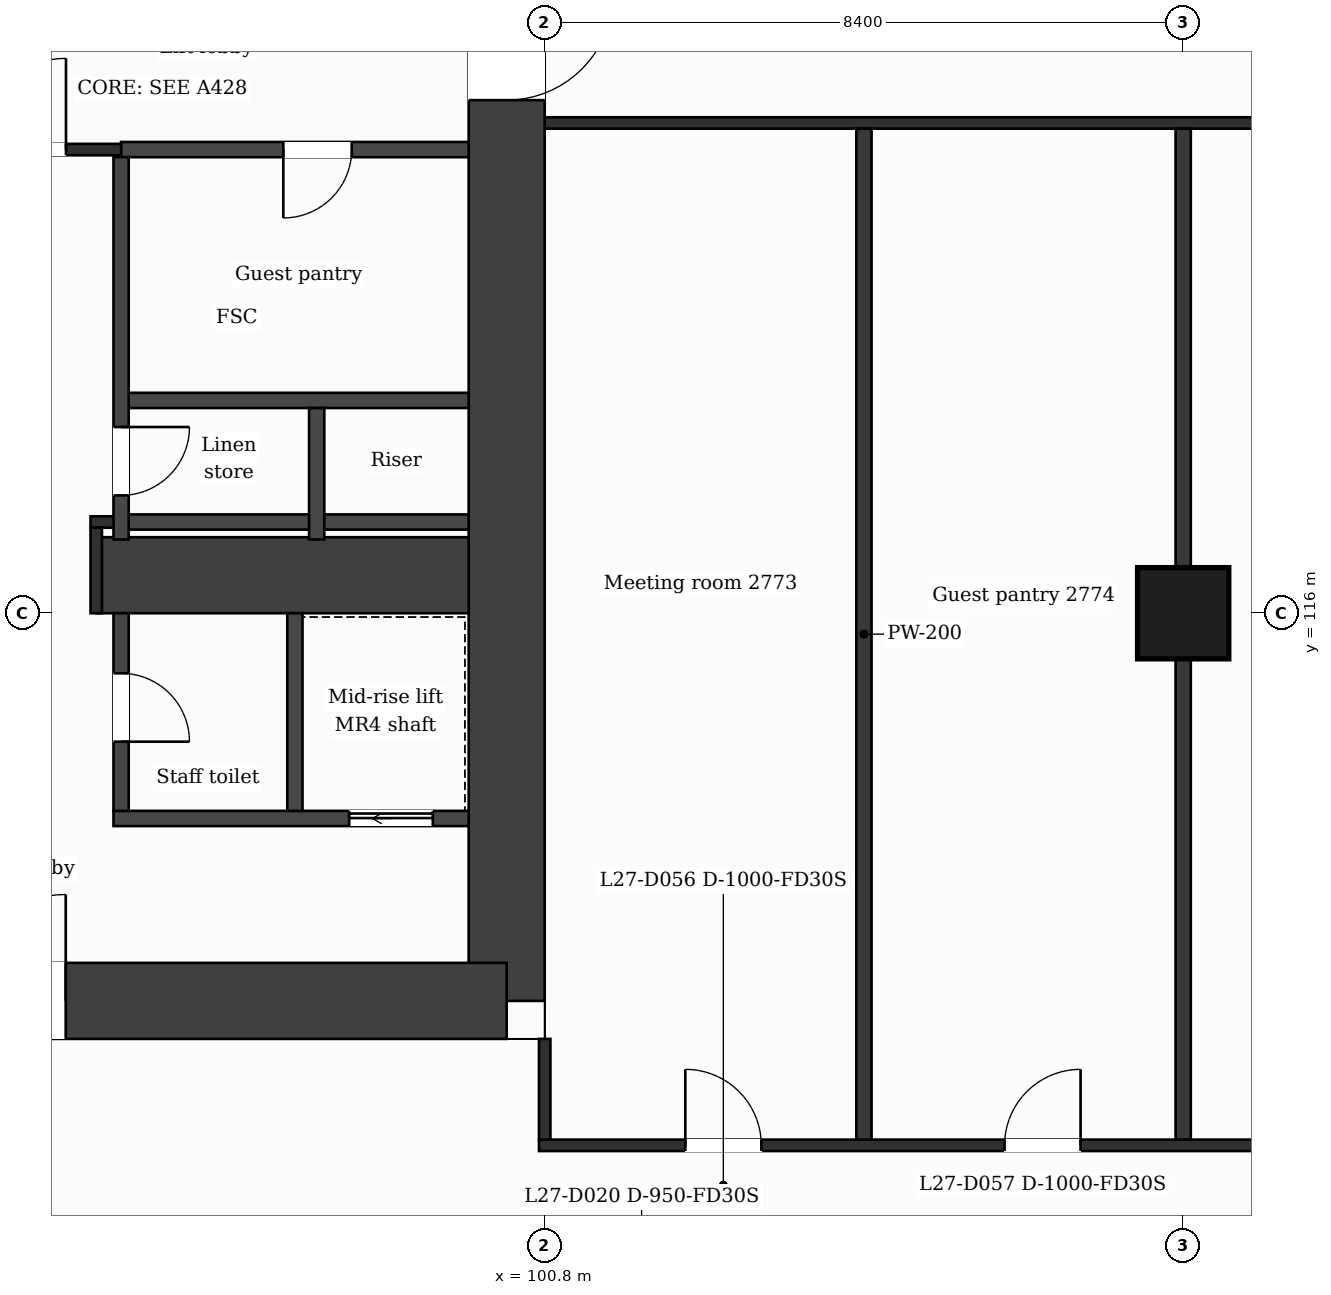
"""IFC4 building model, lengths in metres.
Left out: names, types, materials, properties, quantities, classifications, styles, units other than length and angle.
Written with IfcOpenShell. Run it as: python <this file> out.ifc"""

import sys

from ifc_helpers import new_model, si_unit, direction, frame, frame_2d, origin, origin_2d, place, context, subcontext, project, spatial, rectangle, extrude, element, fill, save


model = new_model("IFC4")
c1 = context("Model", 3, precision=1e-05, world=origin(), true_north=direction((0.0, 1.0)))
c2 = subcontext(c1, "Body", "Model", "MODEL_VIEW")
j1 = project(units=[si_unit("LENGTHUNIT", "METRE"), si_unit("PLANEANGLEUNIT", "RADIAN")], contexts=[c1])
p1 = place(None, origin())
s1 = spatial("IfcSite", under=j1, at=p1, CompositionType="ELEMENT")
p2 = place(p1, origin())
s2 = spatial("IfcBuilding", under=s1, at=p2, CompositionType="ELEMENT")
p3 = place(p2, frame((0.0, 0.0, 116.9)))
s3 = spatial("IfcBuildingStorey", under=s2, at=p3, CompositionType="ELEMENT", Elevation=116.9)
p4 = place(p3, frame((100.3, 131.9, 0.0), z_axis=(0.0, 0.0, 1.0), x_axis=(0.0, -1.0, 0.0)))
e1 = element("IfcWall", 1, at=p4, inside=s3, PredefinedType="SHEAR", context=c2, shape_type="SweptSolid", body=[
    extrude(rectangle(XDim=21.0, YDim=1.0, at=frame_2d((10.5, 0.0))), origin(), (0.0, 0.0, 1.0), 3.7),
])
p5 = place(p4, frame((7.75, 0.0, 0.0)))
e2 = element("IfcOpeningElement", 2, at=p5, cuts=e1, PredefinedType="OPENING", context=c2, shape_type="SweptSolid", body=[
    extrude(rectangle(XDim=1.4, YDim=2.1, at=frame_2d((0.7, 1.05))), frame((0.0, 0.51, 0.0), z_axis=(0.0, -1.0, 0.0), x_axis=(1.0, 0.0, 0.0)), (0.0, 0.0, 1.0), 1.02),
])
p6 = place(p3, frame((100.3, 110.9, 0.0), z_axis=(0.0, 0.0, 1.0), x_axis=(-1.0, 0.0, 0.0)))
e3 = element("IfcWall", 3, at=p6, inside=s3, PredefinedType="SHEAR", context=c2, shape_type="SweptSolid", body=[
    extrude(rectangle(XDim=14.059, YDim=1.0, at=frame_2d((7.03, 0.0))), origin(), (0.0, 0.0, 1.0), 3.7),
])
p7 = place(p6, frame((5.802, 0.0, 0.0)))
e4 = element("IfcOpeningElement", 4, at=p7, cuts=e3, PredefinedType="OPENING", context=c2, shape_type="SweptSolid", body=[
    extrude(rectangle(XDim=1.4, YDim=2.1, at=frame_2d((0.7, 1.05))), frame((0.0, 0.51, 0.0), z_axis=(0.0, -1.0, 0.0), x_axis=(1.0, 0.0, 0.0)), (0.0, 0.0, 1.0), 1.02),
])
p8 = place(p3, frame((94.9, 116.5, 0.0), z_axis=(0.0, 0.0, 1.0), x_axis=(1.0, 0.0, 0.0)))
e5 = element("IfcWall", 5, at=p8, inside=s3, PredefinedType="SHEAR", context=c2, shape_type="SweptSolid", body=[
    extrude(rectangle(XDim=4.9, YDim=1.0, at=frame_2d((2.45, 0.0))), origin(), (0.0, 0.0, 1.0), 3.7),
])
p9 = place(p3, frame((109.2, 116.0, 0.0), z_axis=(0.0, 0.0, 1.0), x_axis=(1.0, 0.0, 0.0)))
e6 = element("IfcColumn", 6, at=p9, inside=s3, PredefinedType="COLUMN", context=c2, shape_type="SweptSolid", body=[
    extrude(rectangle(XDim=1.2, YDim=1.2, at=origin_2d()), origin(), (0.0, 0.0, 1.0), 3.7),
])
p10 = place(p3, frame((100.725, 109.0, 0.0), z_axis=(0.0, 0.0, 1.0), x_axis=(1.0, 0.0, 0.0)))
e7 = element("IfcWall", 7, at=p10, inside=s3, PredefinedType="PARTITIONING", context=c2, shape_type="SweptSolid", body=[
    extrude(rectangle(XDim=25.35, YDim=0.15, at=frame_2d((12.675, 0.0))), origin(), (0.0, 0.0, 1.0), 3.38),
])
p11 = place(p10, frame((1.925, 0.0, 0.0)))
e8 = element("IfcOpeningElement", 8, at=p11, cuts=e7, PredefinedType="OPENING", context=c2, shape_type="SweptSolid", body=[
    extrude(rectangle(XDim=1.0, YDim=2.1, at=frame_2d((0.5, 1.05))), frame((0.0, 0.085, 0.0), z_axis=(0.0, -1.0, 0.0), x_axis=(1.0, 0.0, 0.0)), (0.0, 0.0, 1.0), 0.17),
])
p12 = place(p10, frame((6.125, 0.0, 0.0)))
e9 = element("IfcOpeningElement", 9, at=p12, cuts=e7, PredefinedType="OPENING", context=c2, shape_type="SweptSolid", body=[
    extrude(rectangle(XDim=1.0, YDim=2.1, at=frame_2d((0.5, 1.05))), frame((0.0, 0.085, 0.0), z_axis=(0.0, -1.0, 0.0), x_axis=(1.0, 0.0, 0.0)), (0.0, 0.0, 1.0), 0.17),
])
p13 = place(p10, frame((12.175, 0.0, 0.0)))
e10 = element("IfcOpeningElement", 10, at=p13, cuts=e7, PredefinedType="OPENING", context=c2, shape_type="SweptSolid", body=[
    extrude(rectangle(XDim=1.0, YDim=2.1, at=frame_2d((0.5, 1.05))), frame((0.0, 0.085, 0.0), z_axis=(0.0, -1.0, 0.0), x_axis=(1.0, 0.0, 0.0)), (0.0, 0.0, 1.0), 0.17),
])
p14 = place(p10, frame((19.1, 0.0, 0.0)))
e11 = element("IfcOpeningElement", 11, at=p14, cuts=e7, PredefinedType="OPENING", context=c2, shape_type="SweptSolid", body=[
    extrude(rectangle(XDim=1.0, YDim=2.1, at=frame_2d((0.5, 1.05))), frame((0.0, 0.085, 0.0), z_axis=(0.0, -1.0, 0.0), x_axis=(1.0, 0.0, 0.0)), (0.0, 0.0, 1.0), 0.17),
])
p15 = place(p10, frame((22.05, 0.0, 0.0)))
e12 = element("IfcOpeningElement", 12, at=p15, cuts=e7, PredefinedType="OPENING", context=c2, shape_type="SweptSolid", body=[
    extrude(rectangle(XDim=1.0, YDim=2.1, at=frame_2d((0.5, 1.05))), frame((0.0, 0.085, 0.0), z_axis=(0.0, -1.0, 0.0), x_axis=(1.0, 0.0, 0.0)), (0.0, 0.0, 1.0), 0.17),
])
p16 = place(p3, frame((95.127, 113.3, 0.0), z_axis=(0.0, 0.0, 1.0), x_axis=(1.0, 0.0, 0.0)))
e13 = element("IfcWall", 13, at=p16, inside=s3, PredefinedType="PARTITIONING", context=c2, shape_type="SweptSolid", body=[
    extrude(rectangle(XDim=4.673, YDim=0.2, at=frame_2d((2.336, 0.0))), origin(), (0.0, 0.0, 1.0), 3.38),
])
p17 = place(p16, frame((3.101, 0.0, 0.0)))
e14 = element("IfcOpeningElement", 14, at=p17, cuts=e13, PredefinedType="OPENING", context=c2, shape_type="SweptSolid", body=[
    extrude(rectangle(XDim=1.1, YDim=2.1, at=frame_2d((0.55, 1.05))), frame((0.0, 0.11, 0.0), z_axis=(0.0, -1.0, 0.0), x_axis=(1.0, 0.0, 0.0)), (0.0, 0.0, 1.0), 0.22),
])
p18 = place(p3, frame((95.227, 117.2, 0.0), z_axis=(0.0, 0.0, 1.0), x_axis=(1.0, 0.0, 0.0)))
e15 = element("IfcWall", 15, at=p18, inside=s3, PredefinedType="PARTITIONING", context=c2, shape_type="SweptSolid", body=[
    extrude(rectangle(XDim=4.573, YDim=0.2, at=frame_2d((2.287, 0.0))), origin(), (0.0, 0.0, 1.0), 3.38),
])
p19 = place(p3, frame((94.825, 117.2, 0.0), z_axis=(0.0, 0.0, 1.0), x_axis=(1.0, 0.0, 0.0)))
e16 = element("IfcWall", 16, at=p19, inside=s3, PredefinedType="PARTITIONING", context=c2, shape_type="SweptSolid", body=[
    extrude(rectangle(XDim=0.402, YDim=0.15, at=frame_2d((0.201, 0.0))), origin(), (0.0, 0.0, 1.0), 3.38),
])
p20 = place(p3, frame((95.227, 118.8, 0.0), z_axis=(0.0, 0.0, 1.0), x_axis=(1.0, 0.0, 0.0)))
e17 = element("IfcWall", 17, at=p20, inside=s3, PredefinedType="PARTITIONING", context=c2, shape_type="SweptSolid", body=[
    extrude(rectangle(XDim=4.573, YDim=0.2, at=frame_2d((2.287, 0.0))), origin(), (0.0, 0.0, 1.0), 3.38),
])
p21 = place(p3, frame((95.227, 122.1, 0.0), z_axis=(0.0, 0.0, 1.0), x_axis=(1.0, 0.0, 0.0)))
e18 = element("IfcWall", 18, at=p21, inside=s3, PredefinedType="PARTITIONING", context=c2, shape_type="SweptSolid", body=[
    extrude(rectangle(XDim=4.573, YDim=0.2, at=frame_2d((2.287, 0.0))), origin(), (0.0, 0.0, 1.0), 3.38),
])
p22 = place(p21, frame((2.134, 0.0, 0.0)))
e19 = element("IfcOpeningElement", 19, at=p22, cuts=e18, PredefinedType="OPENING", context=c2, shape_type="SweptSolid", body=[
    extrude(rectangle(XDim=0.9, YDim=2.1, at=frame_2d((0.45, 1.05))), frame((0.0, 0.11, 0.0), z_axis=(0.0, -1.0, 0.0), x_axis=(1.0, 0.0, 0.0)), (0.0, 0.0, 1.0), 0.22),
])
p23 = place(p3, frame((92.827, 122.1, 0.0), z_axis=(0.0, 0.0, 1.0), x_axis=(1.0, 0.0, 0.0)))
e20 = element("IfcWall", 20, at=p23, inside=s3, PredefinedType="PARTITIONING", context=c2, shape_type="SweptSolid", body=[
    extrude(rectangle(XDim=2.4, YDim=0.15, at=frame_2d((1.2, 0.0))), origin(), (0.0, 0.0, 1.0), 3.38),
])
p24 = place(p23, frame((0.475, 0.0, 0.0)))
e21 = element("IfcOpeningElement", 21, at=p24, cuts=e20, PredefinedType="OPENING", context=c2, shape_type="SweptSolid", body=[
    extrude(rectangle(XDim=1.2, YDim=2.1, at=frame_2d((0.6, 1.05))), frame((0.0, 0.085, 0.0), z_axis=(0.0, -1.0, 0.0), x_axis=(1.0, 0.0, 0.0)), (0.0, 0.0, 1.0), 0.17),
])
p25 = place(p3, frame((100.8, 122.45, 0.0), z_axis=(0.0, 0.0, 1.0), x_axis=(1.0, 0.0, 0.0)))
e22 = element("IfcWall", 22, at=p25, inside=s3, PredefinedType="PARTITIONING", context=c2, shape_type="SweptSolid", body=[
    extrude(rectangle(XDim=25.2, YDim=0.15, at=frame_2d((12.6, 0.0))), origin(), (0.0, 0.0, 1.0), 3.38),
])
p26 = place(p3, frame((94.9, 116.0, 0.0), z_axis=(0.0, 0.0, 1.0), x_axis=(0.0, 1.0, 0.0)))
e23 = element("IfcWall", 23, at=p26, inside=s3, PredefinedType="PARTITIONING", context=c2, shape_type="SweptSolid", body=[
    extrude(rectangle(XDim=1.125, YDim=0.15, at=frame_2d((0.562, 0.0))), origin(), (0.0, 0.0, 1.0), 3.38),
])
p27 = place(p3, frame((95.227, 113.4, 0.0), z_axis=(0.0, 0.0, 1.0), x_axis=(0.0, 1.0, 0.0)))
e24 = element("IfcWall", 24, at=p27, inside=s3, PredefinedType="PARTITIONING", context=c2, shape_type="SweptSolid", body=[
    extrude(rectangle(XDim=2.6, YDim=0.2, at=frame_2d((1.3, 0.0))), origin(), (0.0, 0.0, 1.0), 3.38),
])
p28 = place(p27, frame((0.91, 0.0, 0.0)))
e25 = element("IfcOpeningElement", 25, at=p28, cuts=e24, PredefinedType="OPENING", context=c2, shape_type="SweptSolid", body=[
    extrude(rectangle(XDim=0.9, YDim=2.1, at=frame_2d((0.45, 1.05))), frame((0.0, 0.11, 0.0), z_axis=(0.0, -1.0, 0.0), x_axis=(1.0, 0.0, 0.0)), (0.0, 0.0, 1.0), 0.22),
])
p29 = place(p3, frame((95.227, 116.97, 0.0), z_axis=(0.0, 0.0, 1.0), x_axis=(0.0, 1.0, 0.0)))
e26 = element("IfcWall", 26, at=p29, inside=s3, PredefinedType="PARTITIONING", context=c2, shape_type="SweptSolid", body=[
    extrude(rectangle(XDim=5.03, YDim=0.2, at=frame_2d((2.515, 0.0))), origin(), (0.0, 0.0, 1.0), 3.38),
])
p30 = place(p29, frame((0.58, 0.0, 0.0)))
e27 = element("IfcOpeningElement", 27, at=p30, cuts=e26, PredefinedType="OPENING", context=c2, shape_type="SweptSolid", body=[
    extrude(rectangle(XDim=0.9, YDim=2.1, at=frame_2d((0.45, 1.05))), frame((0.0, 0.11, 0.0), z_axis=(0.0, -1.0, 0.0), x_axis=(1.0, 0.0, 0.0)), (0.0, 0.0, 1.0), 0.22),
])
p31 = place(p3, frame((97.513, 113.4, 0.0), z_axis=(0.0, 0.0, 1.0), x_axis=(0.0, 1.0, 0.0)))
e28 = element("IfcWall", 28, at=p31, inside=s3, PredefinedType="PARTITIONING", context=c2, shape_type="SweptSolid", body=[
    extrude(rectangle(XDim=2.6, YDim=0.2, at=frame_2d((1.3, 0.0))), origin(), (0.0, 0.0, 1.0), 3.38),
])
p32 = place(p3, frame((97.8, 116.97, 0.0), z_axis=(0.0, 0.0, 1.0), x_axis=(0.0, 1.0, 0.0)))
e29 = element("IfcWall", 29, at=p32, inside=s3, PredefinedType="PARTITIONING", context=c2, shape_type="SweptSolid", body=[
    extrude(rectangle(XDim=1.73, YDim=0.2, at=frame_2d((0.865, 0.0))), origin(), (0.0, 0.0, 1.0), 3.38),
])
p33 = place(p3, frame((100.8, 109.075, 0.0), z_axis=(0.0, 0.0, 1.0), x_axis=(0.0, 1.0, 0.0)))
e30 = element("IfcWall", 30, at=p33, inside=s3, PredefinedType="PARTITIONING", context=c2, shape_type="SweptSolid", body=[
    extrude(rectangle(XDim=1.325, YDim=0.15, at=frame_2d((0.663, 0.0))), origin(), (0.0, 0.0, 1.0), 3.38),
])
for number, where, z_axis, x_axis in (
    (31, (105.0, 109.075, 0.0), (0.0, 0.0, 1.0), (0.0, 1.0, 0.0)),
    (32, (109.2, 109.075, 0.0), (0.0, 0.0, 1.0), (0.0, 1.0, 0.0)),
):
    element("IfcWall", number, at=place(p3, frame(where, z_axis=z_axis, x_axis=x_axis)), inside=s3, PredefinedType="PARTITIONING", context=c2, shape_type="SweptSolid", body=[
        extrude(rectangle(XDim=13.3, YDim=0.2, at=frame_2d((6.65, 0.0))), origin(), (0.0, 0.0, 1.0), 3.38),
    ])
p34 = place(p24, origin())
e33 = element("IfcDoor", 33, at=p34, inside=s3, OperationType="SINGLE_SWING_RIGHT", PredefinedType="DOOR", context=c2, shape_type="SweptSolid", body=[
    extrude(rectangle(XDim=1.2, YDim=2.1, at=frame_2d((0.6, 1.05))), frame((0.0, 0.025, 0.0), z_axis=(0.0, -1.0, 0.0), x_axis=(1.0, 0.0, 0.0)), (0.0, 0.0, 1.0), 0.05),
])
fill(e21, e33)
p35 = place(p22, origin())
e34 = element("IfcDoor", 34, at=p35, inside=s3, OperationType="SINGLE_SWING_LEFT", PredefinedType="DOOR", context=c2, shape_type="SweptSolid", body=[
    extrude(rectangle(XDim=0.9, YDim=2.1, at=frame_2d((0.45, 1.05))), frame((0.0, 0.025, 0.0), z_axis=(0.0, -1.0, 0.0), x_axis=(1.0, 0.0, 0.0)), (0.0, 0.0, 1.0), 0.05),
])
fill(e19, e34)
p36 = place(p30, origin())
e35 = element("IfcDoor", 35, at=p36, inside=s3, OperationType="SINGLE_SWING_RIGHT", PredefinedType="DOOR", context=c2, shape_type="SweptSolid", body=[
    extrude(rectangle(XDim=0.9, YDim=2.1, at=frame_2d((0.45, 1.05))), frame((0.0, 0.025, 0.0), z_axis=(0.0, -1.0, 0.0), x_axis=(1.0, 0.0, 0.0)), (0.0, 0.0, 1.0), 0.05),
])
fill(e27, e35)
p37 = place(p17, origin())
e36 = element("IfcDoor", 36, at=p37, inside=s3, OperationType="SLIDING_TO_LEFT", PredefinedType="DOOR", context=c2, shape_type="SweptSolid", body=[
    extrude(rectangle(XDim=1.1, YDim=2.1, at=frame_2d((0.55, 1.05))), frame((0.0, 0.025, 0.0), z_axis=(0.0, -1.0, 0.0), x_axis=(1.0, 0.0, 0.0)), (0.0, 0.0, 1.0), 0.05),
])
fill(e14, e36)
p38 = place(p28, origin())
e37 = element("IfcDoor", 37, at=p38, inside=s3, OperationType="SINGLE_SWING_LEFT", PredefinedType="DOOR", context=c2, shape_type="SweptSolid", body=[
    extrude(rectangle(XDim=0.9, YDim=2.1, at=frame_2d((0.45, 1.05))), frame((0.0, 0.025, 0.0), z_axis=(0.0, -1.0, 0.0), x_axis=(1.0, 0.0, 0.0)), (0.0, 0.0, 1.0), 0.05),
])
fill(e25, e37)
p39 = place(p11, origin())
e38 = element("IfcDoor", 38, at=p39, inside=s3, OperationType="SINGLE_SWING_LEFT", PredefinedType="DOOR", context=c2, shape_type="SweptSolid", body=[
    extrude(rectangle(XDim=1.0, YDim=2.1, at=frame_2d((0.5, 1.05))), frame((0.0, 0.025, 0.0), z_axis=(0.0, -1.0, 0.0), x_axis=(1.0, 0.0, 0.0)), (0.0, 0.0, 1.0), 0.05),
])
fill(e8, e38)
p40 = place(p12, origin())
e39 = element("IfcDoor", 39, at=p40, inside=s3, OperationType="SINGLE_SWING_RIGHT", PredefinedType="DOOR", context=c2, shape_type="SweptSolid", body=[
    extrude(rectangle(XDim=1.0, YDim=2.1, at=frame_2d((0.5, 1.05))), frame((0.0, 0.025, 0.0), z_axis=(0.0, -1.0, 0.0), x_axis=(1.0, 0.0, 0.0)), (0.0, 0.0, 1.0), 0.05),
])
fill(e9, e39)
p41 = place(p7, origin())
e40 = element("IfcDoor", 40, at=p41, inside=s3, OperationType="SINGLE_SWING_LEFT", PredefinedType="DOOR", context=c2, shape_type="SweptSolid", body=[
    extrude(rectangle(XDim=1.4, YDim=2.1, at=frame_2d((0.7, 1.05))), frame((0.0, 0.025, 0.0), z_axis=(0.0, -1.0, 0.0), x_axis=(1.0, 0.0, 0.0)), (0.0, 0.0, 1.0), 0.05),
])
fill(e4, e40)
p42 = place(p5, origin())
e41 = element("IfcDoor", 41, at=p42, inside=s3, OperationType="SINGLE_SWING_LEFT", PredefinedType="DOOR", context=c2, shape_type="SweptSolid", body=[
    extrude(rectangle(XDim=1.4, YDim=2.1, at=frame_2d((0.7, 1.05))), frame((0.0, 0.025, 0.0), z_axis=(0.0, -1.0, 0.0), x_axis=(1.0, 0.0, 0.0)), (0.0, 0.0, 1.0), 0.05),
])
fill(e2, e41)
save(model, sys.argv[1])
